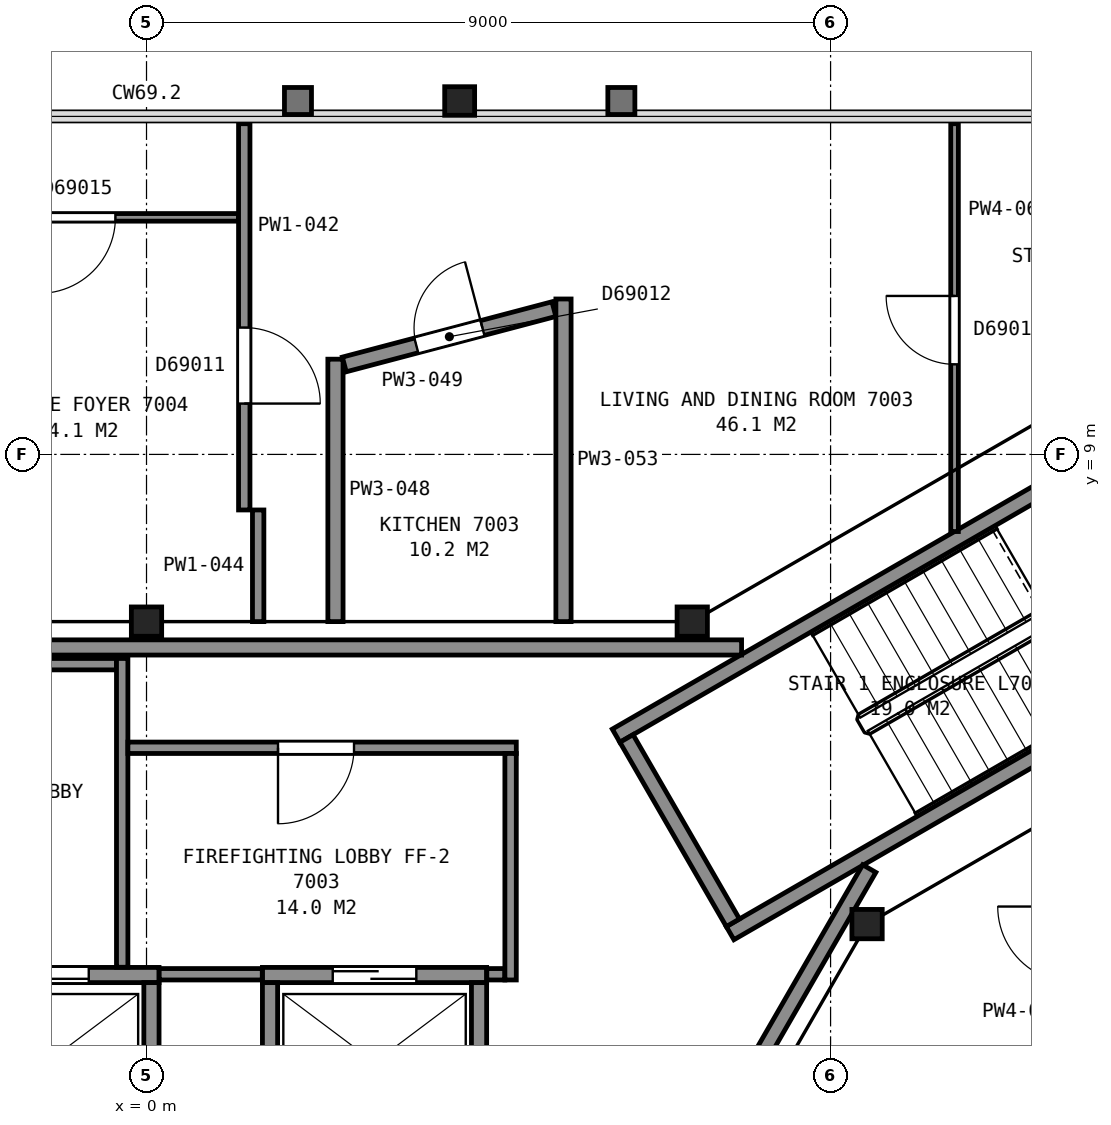
"""IFC4 building model, lengths in metres.
Left out: names, types, materials, properties, quantities, classifications, styles, units other than length and angle.
Written with IfcOpenShell. Run it as: python <this file> out.ifc"""

import sys

from ifc_helpers import new_model, si_unit, direction, frame, frame_2d, origin, origin_2d, place, context, subcontext, project, spatial, rectangle, i_section, extrude, element, fill, save


model = new_model("IFC4")
c1 = context("Model", 3, precision=1e-05, world=origin(), true_north=direction((0.0, 1.0)))
c2 = subcontext(c1, "Body", "Model", "MODEL_VIEW")
j1 = project(units=[si_unit("LENGTHUNIT", "METRE"), si_unit("PLANEANGLEUNIT", "RADIAN")], contexts=[c1])
p1 = place(None, origin())
s1 = spatial("IfcSite", under=j1, at=p1, CompositionType="ELEMENT")
p2 = place(p1, origin())
s2 = spatial("IfcBuilding", under=s1, at=p2, CompositionType="ELEMENT")
p3 = place(p2, frame((0.0, 0.0, 278.8)))
s3 = spatial("IfcBuildingStorey", under=s2, at=p3, CompositionType="ELEMENT", Elevation=278.8)
p4 = place(p3, frame((4.12, 13.65, 0.0), z_axis=(0.0, 0.0, 1.0), x_axis=(1.0, 0.0, 0.0)))
e1 = element("IfcColumn", 1, at=p4, inside=s3, PredefinedType="COLUMN", context=c2, shape_type="SweptSolid", body=[
    extrude(i_section(OverallWidth=0.394, OverallDepth=0.376, WebThickness=0.017, FlangeThickness=0.028, FilletRadius=0.015, at=origin_2d()), origin(), (0.0, 0.0, 1.0), 3.7),
])
for number, where, z_axis, x_axis in (
    (2, (9.48, 2.82, 0.0), (0.0, 0.0, 1.0), (1.0, 0.0, 0.0)),
    (3, (7.18, 6.8, 0.0), (0.0, 0.0, 1.0), (1.0, 0.0, 0.0)),
    (4, (0.0, 6.8, 0.0), (0.0, 0.0, 1.0), (1.0, 0.0, 0.0)),
):
    element("IfcColumn", number, at=place(p3, frame(where, z_axis=z_axis, x_axis=x_axis)), inside=s3, PredefinedType="COLUMN", context=c2, shape_type="SweptSolid", body=[
        extrude(i_section(OverallWidth=0.399, OverallDepth=0.386, WebThickness=0.021, FlangeThickness=0.033, FilletRadius=0.015, at=origin_2d()), origin(), (0.0, 0.0, 1.0), 3.7),
    ])
for number, where, z_axis, x_axis in (
    (5, (6.178, 5.299, 0.0), (0.0, 0.0, 1.0), (0.866, 0.5, 0.0)),
    (6, (7.678, 2.701, 0.0), (0.0, 0.0, 1.0), (0.866, 0.5, 0.0)),
):
    element("IfcWall", number, at=place(p3, frame(where, z_axis=z_axis, x_axis=x_axis)), inside=s3, PredefinedType="PARTITIONING", context=c2, shape_type="SweptSolid", body=[
        extrude(rectangle(XDim=7.2, YDim=0.2, at=frame_2d((3.6, 0.0))), origin(), (0.0, 0.0, 1.0), 3.45),
    ])
p5 = place(p3, frame((7.715, 2.838, 0.0), z_axis=(0.0, 0.0, 1.0), x_axis=(-0.500049511043, 0.865996816683, 0.0)))
e7 = element("IfcWall", 7, at=p5, inside=s3, PredefinedType="PARTITIONING", context=c2, shape_type="SweptSolid", body=[
    extrude(rectangle(XDim=2.8, YDim=0.2, at=frame_2d((1.4, 0.0))), origin(), (0.0, 0.0, 1.0), 3.45),
])
p6 = place(p3, frame((-2.785, 2.15, 0.0), z_axis=(0.0, 0.0, 1.0), x_axis=(1.0, 0.0, 0.0)))
e8 = element("IfcWall", 8, at=p6, inside=s3, PredefinedType="PARTITIONING", context=c2, shape_type="SweptSolid", body=[
    extrude(rectangle(XDim=2.95, YDim=0.2, at=frame_2d((1.475, 0.0))), origin(), (0.0, 0.0, 1.0), 3.7),
])
p7 = place(p6, frame((0.925, 0.0, 0.0)))
e9 = element("IfcOpeningElement", 9, at=p7, cuts=e8, PredefinedType="OPENING", context=c2, shape_type="SweptSolid", body=[
    extrude(rectangle(XDim=1.1, YDim=2.1, at=frame_2d((0.55, 1.05))), frame((0.0, 0.11, 0.0), z_axis=(0.0, -1.0, 0.0), x_axis=(1.0, 0.0, 0.0)), (0.0, 0.0, 1.0), 0.22),
])
p8 = place(p3, frame((1.525, 2.15, 0.0), z_axis=(0.0, 0.0, 1.0), x_axis=(1.0, 0.0, 0.0)))
e10 = element("IfcWall", 10, at=p8, inside=s3, PredefinedType="PARTITIONING", context=c2, shape_type="SweptSolid", body=[
    extrude(rectangle(XDim=2.95, YDim=0.2, at=frame_2d((1.475, 0.0))), origin(), (0.0, 0.0, 1.0), 3.7),
])
p9 = place(p8, frame((0.925, 0.0, 0.0)))
e11 = element("IfcOpeningElement", 11, at=p9, cuts=e10, PredefinedType="OPENING", context=c2, shape_type="SweptSolid", body=[
    extrude(rectangle(XDim=1.1, YDim=2.1, at=frame_2d((0.55, 1.05))), frame((0.0, 0.11, 0.0), z_axis=(0.0, -1.0, 0.0), x_axis=(1.0, 0.0, 0.0)), (0.0, 0.0, 1.0), 0.22),
])
for number, where, z_axis, x_axis in (
    (12, (4.375, 0.1, 0.0), (0.0, 0.0, 1.0), (0.0, 1.0, 0.0)),
    (13, (1.625, 0.1, 0.0), (0.0, 0.0, 1.0), (0.0, 1.0, 0.0)),
    (14, (0.065, 0.1, 0.0), (0.0, 0.0, 1.0), (0.0, 1.0, 0.0)),
):
    element("IfcWall", number, at=place(p3, frame(where, z_axis=z_axis, x_axis=x_axis)), inside=s3, PredefinedType="PARTITIONING", context=c2, shape_type="SweptSolid", body=[
        extrude(rectangle(XDim=1.95, YDim=0.2, at=frame_2d((0.975, 0.0))), origin(), (0.0, 0.0, 1.0), 3.7),
    ])
p10 = place(p3, frame((7.829, 6.46, 0.0), z_axis=(0.0, 0.0, 1.0), x_axis=(-1.0, 0.0, 0.0)))
e15 = element("IfcWall", 15, at=p10, inside=s3, PredefinedType="PARTITIONING", context=c2, shape_type="SweptSolid", body=[
    extrude(rectangle(XDim=15.658, YDim=0.2, at=frame_2d((7.829, 0.0))), origin(), (0.0, 0.0, 1.0), 3.45),
])
p11 = place(p10, frame((12.168, 0.0, 0.0)))
e16 = element("IfcOpeningElement", 16, at=p11, cuts=e15, PredefinedType="OPENING", context=c2, shape_type="SweptSolid", body=[
    extrude(rectangle(XDim=1.2, YDim=2.1, at=frame_2d((0.6, 1.05))), frame((0.0, 0.11, 0.0), z_axis=(0.0, -1.0, 0.0), x_axis=(1.0, 0.0, 0.0)), (0.0, 0.0, 1.0), 0.22),
])
p12 = place(p3, frame((-4.025, 6.24, 0.0), z_axis=(0.0, 0.0, 1.0), x_axis=(1.0, 0.0, 0.0)))
e17 = element("IfcWall", 17, at=p12, inside=s3, PredefinedType="PARTITIONING", context=c2, shape_type="SweptSolid", body=[
    extrude(rectangle(XDim=3.63, YDim=0.15, at=frame_2d((1.815, 0.0))), origin(), (0.0, 0.0, 1.0), 3.45),
])
p13 = place(p3, frame((-0.32, 2.252, 0.0), z_axis=(0.0, 0.0, 1.0), x_axis=(0.0, 1.0, 0.0)))
e18 = element("IfcWall", 18, at=p13, inside=s3, PredefinedType="PARTITIONING", context=c2, shape_type="SweptSolid", body=[
    extrude(rectangle(XDim=4.063, YDim=0.15, at=frame_2d((2.031, 0.0))), origin(), (0.0, 0.0, 1.0), 3.45),
])
p14 = place(p3, frame((-0.245, 5.14, 0.0), z_axis=(0.0, 0.0, 1.0), x_axis=(1.0, 0.0, 0.0)))
e19 = element("IfcWall", 19, at=p14, inside=s3, PredefinedType="PARTITIONING", context=c2, shape_type="SweptSolid", body=[
    extrude(rectangle(XDim=5.11, YDim=0.15, at=frame_2d((2.555, 0.0))), origin(), (0.0, 0.0, 1.0), 3.45),
])
p15 = place(p14, frame((1.975, 0.0, 0.0)))
e20 = element("IfcOpeningElement", 20, at=p15, cuts=e19, PredefinedType="OPENING", context=c2, shape_type="SweptSolid", body=[
    extrude(rectangle(XDim=1.0, YDim=2.1, at=frame_2d((0.5, 1.05))), frame((0.0, 0.085, 0.0), z_axis=(0.0, -1.0, 0.0), x_axis=(1.0, 0.0, 0.0)), (0.0, 0.0, 1.0), 0.17),
])
p16 = place(p3, frame((0.167, 2.16, 0.0), z_axis=(0.0, 0.0, 1.0), x_axis=(1.0, 0.0, 0.0)))
e21 = element("IfcWall", 21, at=p16, inside=s3, PredefinedType="PARTITIONING", context=c2, shape_type="SweptSolid", body=[
    extrude(rectangle(XDim=1.356, YDim=0.15, at=frame_2d((0.678, 0.0))), origin(), (0.0, 0.0, 1.0), 3.45),
])
p17 = place(p3, frame((3.828, -6.29, 0.0), z_axis=(0.0, 0.0, 1.0), x_axis=(0.499979739078, 0.866037101117, 0.0)))
e22 = element("IfcWall", 22, at=p17, inside=s3, PredefinedType="PARTITIONING", context=c2, shape_type="SweptSolid", body=[
    extrude(rectangle(XDim=11.363, YDim=0.2, at=frame_2d((5.681, 0.0))), origin(), (0.0, 0.0, 1.0), 3.45),
])
p18 = place(p17, frame((0.55, 0.0, 0.0)))
e23 = element("IfcOpeningElement", 23, at=p18, cuts=e22, PredefinedType="OPENING", context=c2, shape_type="SweptSolid", body=[
    extrude(rectangle(XDim=1.2, YDim=2.1, at=frame_2d((0.6, 1.05))), frame((0.0, 0.11, 0.0), z_axis=(0.0, -1.0, 0.0), x_axis=(1.0, 0.0, 0.0)), (0.0, 0.0, 1.0), 0.22),
])
p19 = place(p3, frame((4.477, 2.16, 0.0), z_axis=(0.0, 0.0, 1.0), x_axis=(1.0, 0.0, 0.0)))
e24 = element("IfcWall", 24, at=p19, inside=s3, PredefinedType="PARTITIONING", context=c2, shape_type="SweptSolid", body=[
    extrude(rectangle(XDim=0.238, YDim=0.15, at=frame_2d((0.119, 0.0))), origin(), (0.0, 0.0, 1.0), 3.45),
])
p20 = place(p3, frame((4.79, 2.085, 0.0), z_axis=(0.0, 0.0, 1.0), x_axis=(0.0, 1.0, 0.0)))
e25 = element("IfcWall", 25, at=p20, inside=s3, PredefinedType="PARTITIONING", context=c2, shape_type="SweptSolid", body=[
    extrude(rectangle(XDim=2.98, YDim=0.15, at=frame_2d((1.49, 0.0))), origin(), (0.0, 0.0, 1.0), 3.45),
])
p21 = place(p3, frame((-3.109, 12.119, 0.0), z_axis=(0.0, 0.0, 1.0), x_axis=(1.0, 0.0, 0.0)))
e26 = element("IfcWall", 26, at=p21, inside=s3, PredefinedType="PARTITIONING", context=c2, shape_type="SweptSolid", body=[
    extrude(rectangle(XDim=4.32, YDim=0.1, at=frame_2d((2.16, 0.0))), origin(), (0.0, 0.0, 1.0), 2.723),
])
p22 = place(p21, frame((1.7, 0.0, 0.0)))
e27 = element("IfcOpeningElement", 27, at=p22, cuts=e26, PredefinedType="OPENING", context=c2, shape_type="SweptSolid", body=[
    extrude(rectangle(XDim=1.0, YDim=2.1, at=frame_2d((0.5, 1.05))), frame((0.0, 0.06, 0.0), z_axis=(0.0, -1.0, 0.0), x_axis=(1.0, 0.0, 0.0)), (0.0, 0.0, 1.0), 0.12),
])
p23 = place(p3, frame((1.286, 13.351, 0.0), z_axis=(0.0, 0.0, 1.0), x_axis=(0.0, -1.0, 0.0)))
e28 = element("IfcWall", 28, at=p23, inside=s3, PredefinedType="PARTITIONING", context=c2, shape_type="SweptSolid", body=[
    extrude(rectangle(XDim=5.082, YDim=0.15, at=frame_2d((2.541, 0.0))), origin(), (0.0, 0.0, 1.0), 2.723),
])
p24 = place(p23, frame((2.682, 0.0, 0.0)))
e29 = element("IfcOpeningElement", 29, at=p24, cuts=e28, PredefinedType="OPENING", context=c2, shape_type="SweptSolid", body=[
    extrude(rectangle(XDim=1.0, YDim=2.1, at=frame_2d((0.5, 1.05))), frame((0.0, 0.085, 0.0), z_axis=(0.0, -1.0, 0.0), x_axis=(1.0, 0.0, 0.0)), (0.0, 0.0, 1.0), 0.17),
])
p25 = place(p3, frame((1.469, 6.8, 0.0), z_axis=(0.0, 0.0, 1.0), x_axis=(0.0, 1.0, 0.0)))
e30 = element("IfcWall", 30, at=p25, inside=s3, PredefinedType="PARTITIONING", context=c2, shape_type="SweptSolid", body=[
    extrude(rectangle(XDim=1.469, YDim=0.15, at=frame_2d((0.734, 0.0))), origin(), (0.0, 0.0, 1.0), 2.723),
])
p26 = place(p3, frame((2.486, 6.8, 0.0), z_axis=(0.0, 0.0, 1.0), x_axis=(0.0, 1.0, 0.0)))
e31 = element("IfcWall", 31, at=p26, inside=s3, PredefinedType="PARTITIONING", context=c2, shape_type="SweptSolid", body=[
    extrude(rectangle(XDim=3.453, YDim=0.2, at=frame_2d((1.727, 0.0))), origin(), (0.0, 0.0, 1.0), 2.723),
])
p27 = place(p3, frame((5.36, 10.912, 0.0), z_axis=(0.0, 0.0, 1.0), x_axis=(-0.966866921155, -0.255280936963, 0.0)))
e32 = element("IfcWall", 32, at=p27, inside=s3, PredefinedType="PARTITIONING", context=c2, shape_type="SweptSolid", body=[
    extrude(rectangle(XDim=2.853, YDim=0.2, at=frame_2d((1.426, 0.0))), origin(), (0.0, 0.0, 1.0), 2.723),
])
p28 = place(p27, frame((0.973, 0.0, 0.0)))
e33 = element("IfcOpeningElement", 33, at=p28, cuts=e32, PredefinedType="OPENING", context=c2, shape_type="SweptSolid", body=[
    extrude(rectangle(XDim=0.9, YDim=2.1, at=frame_2d((0.45, 1.05))), frame((0.0, 0.11, 0.0), z_axis=(0.0, -1.0, 0.0), x_axis=(1.0, 0.0, 0.0)), (0.0, 0.0, 1.0), 0.22),
])
p29 = place(p3, frame((5.486, 6.8, 0.0), z_axis=(0.0, 0.0, 1.0), x_axis=(0.0, 1.0, 0.0)))
e34 = element("IfcWall", 34, at=p29, inside=s3, PredefinedType="PARTITIONING", context=c2, shape_type="SweptSolid", body=[
    extrude(rectangle(XDim=4.245, YDim=0.2, at=frame_2d((2.123, 0.0))), origin(), (0.0, 0.0, 1.0), 2.723),
])
p30 = place(p3, frame((10.631, 13.351, 0.0), z_axis=(0.0, 0.0, 1.0), x_axis=(0.0, -1.0, 0.0)))
e35 = element("IfcWall", 35, at=p30, inside=s3, PredefinedType="PARTITIONING", context=c2, shape_type="SweptSolid", body=[
    extrude(rectangle(XDim=5.366, YDim=0.1, at=frame_2d((2.683, 0.0))), origin(), (0.0, 0.0, 1.0), 2.723),
])
p31 = place(p30, frame((2.266, 0.0, 0.0)))
e36 = element("IfcOpeningElement", 36, at=p31, cuts=e35, PredefinedType="OPENING", context=c2, shape_type="SweptSolid", body=[
    extrude(rectangle(XDim=0.9, YDim=2.1, at=frame_2d((0.45, 1.05))), frame((0.0, 0.06, 0.0), z_axis=(0.0, -1.0, 0.0), x_axis=(1.0, 0.0, 0.0)), (0.0, 0.0, 1.0), 0.12),
])
p32 = place(p3, frame((10.878, 0.03, 0.0), z_axis=(0.0, 0.0, 1.0), x_axis=(0.707173379423, 0.707040176677, 0.0)))
e37 = element("IfcWall", 37, at=p32, inside=s3, PredefinedType="PARTITIONING", context=c2, shape_type="SweptSolid", body=[
    extrude(rectangle(XDim=1.833, YDim=0.2, at=frame_2d((0.917, 0.0))), origin(), (0.0, 0.0, 1.0), 2.723),
])
p33 = place(p7, origin())
e38 = element("IfcDoor", 38, at=p33, inside=s3, OperationType="SLIDING_TO_LEFT", PredefinedType="DOOR", context=c2, shape_type="SweptSolid", body=[
    extrude(rectangle(XDim=1.1, YDim=2.1, at=frame_2d((0.55, 1.05))), frame((0.0, 0.025, 0.0), z_axis=(0.0, -1.0, 0.0), x_axis=(1.0, 0.0, 0.0)), (0.0, 0.0, 1.0), 0.05),
])
fill(e9, e38)
p34 = place(p9, origin())
e39 = element("IfcDoor", 39, at=p34, inside=s3, OperationType="SLIDING_TO_RIGHT", PredefinedType="DOOR", context=c2, shape_type="SweptSolid", body=[
    extrude(rectangle(XDim=1.1, YDim=2.1, at=frame_2d((0.55, 1.05))), frame((0.0, 0.025, 0.0), z_axis=(0.0, -1.0, 0.0), x_axis=(1.0, 0.0, 0.0)), (0.0, 0.0, 1.0), 0.05),
])
fill(e11, e39)
p35 = place(p15, origin())
e40 = element("IfcDoor", 40, at=p35, inside=s3, OperationType="SINGLE_SWING_LEFT", PredefinedType="DOOR", context=c2, shape_type="SweptSolid", body=[
    extrude(rectangle(XDim=1.0, YDim=2.1, at=frame_2d((0.5, 1.05))), frame((0.0, 0.025, 0.0), z_axis=(0.0, -1.0, 0.0), x_axis=(1.0, 0.0, 0.0)), (0.0, 0.0, 1.0), 0.05),
])
fill(e20, e40)
p36 = place(p22, origin())
e41 = element("IfcDoor", 41, at=p36, inside=s3, OperationType="SINGLE_SWING_LEFT", PredefinedType="DOOR", context=c2, shape_type="SweptSolid", body=[
    extrude(rectangle(XDim=1.0, YDim=2.1, at=frame_2d((0.5, 1.05))), frame((0.0, 0.025, 0.0), z_axis=(0.0, -1.0, 0.0), x_axis=(1.0, 0.0, 0.0)), (0.0, 0.0, 1.0), 0.05),
])
fill(e27, e41)
p37 = place(p24, origin())
e42 = element("IfcDoor", 42, at=p37, inside=s3, OperationType="SINGLE_SWING_RIGHT", PredefinedType="DOOR", context=c2, shape_type="SweptSolid", body=[
    extrude(rectangle(XDim=1.0, YDim=2.1, at=frame_2d((0.5, 1.05))), frame((0.0, 0.025, 0.0), z_axis=(0.0, -1.0, 0.0), x_axis=(1.0, 0.0, 0.0)), (0.0, 0.0, 1.0), 0.05),
])
fill(e29, e42)
p38 = place(p28, origin())
e43 = element("IfcDoor", 43, at=p38, inside=s3, OperationType="SINGLE_SWING_LEFT", PredefinedType="DOOR", context=c2, shape_type="SweptSolid", body=[
    extrude(rectangle(XDim=0.9, YDim=2.1, at=frame_2d((0.45, 1.05))), frame((0.0, 0.025, 0.0), z_axis=(0.0, -1.0, 0.0), x_axis=(1.0, 0.0, 0.0)), (0.0, 0.0, 1.0), 0.05),
])
fill(e33, e43)
p39 = place(p31, origin())
e44 = element("IfcDoor", 44, at=p39, inside=s3, OperationType="SINGLE_SWING_LEFT", PredefinedType="DOOR", context=c2, shape_type="SweptSolid", body=[
    extrude(rectangle(XDim=0.9, YDim=2.1, at=frame_2d((0.45, 1.05))), frame((0.0, 0.025, 0.0), z_axis=(0.0, -1.0, 0.0), x_axis=(1.0, 0.0, 0.0)), (0.0, 0.0, 1.0), 0.05),
])
fill(e36, e44)
save(model, sys.argv[1])
